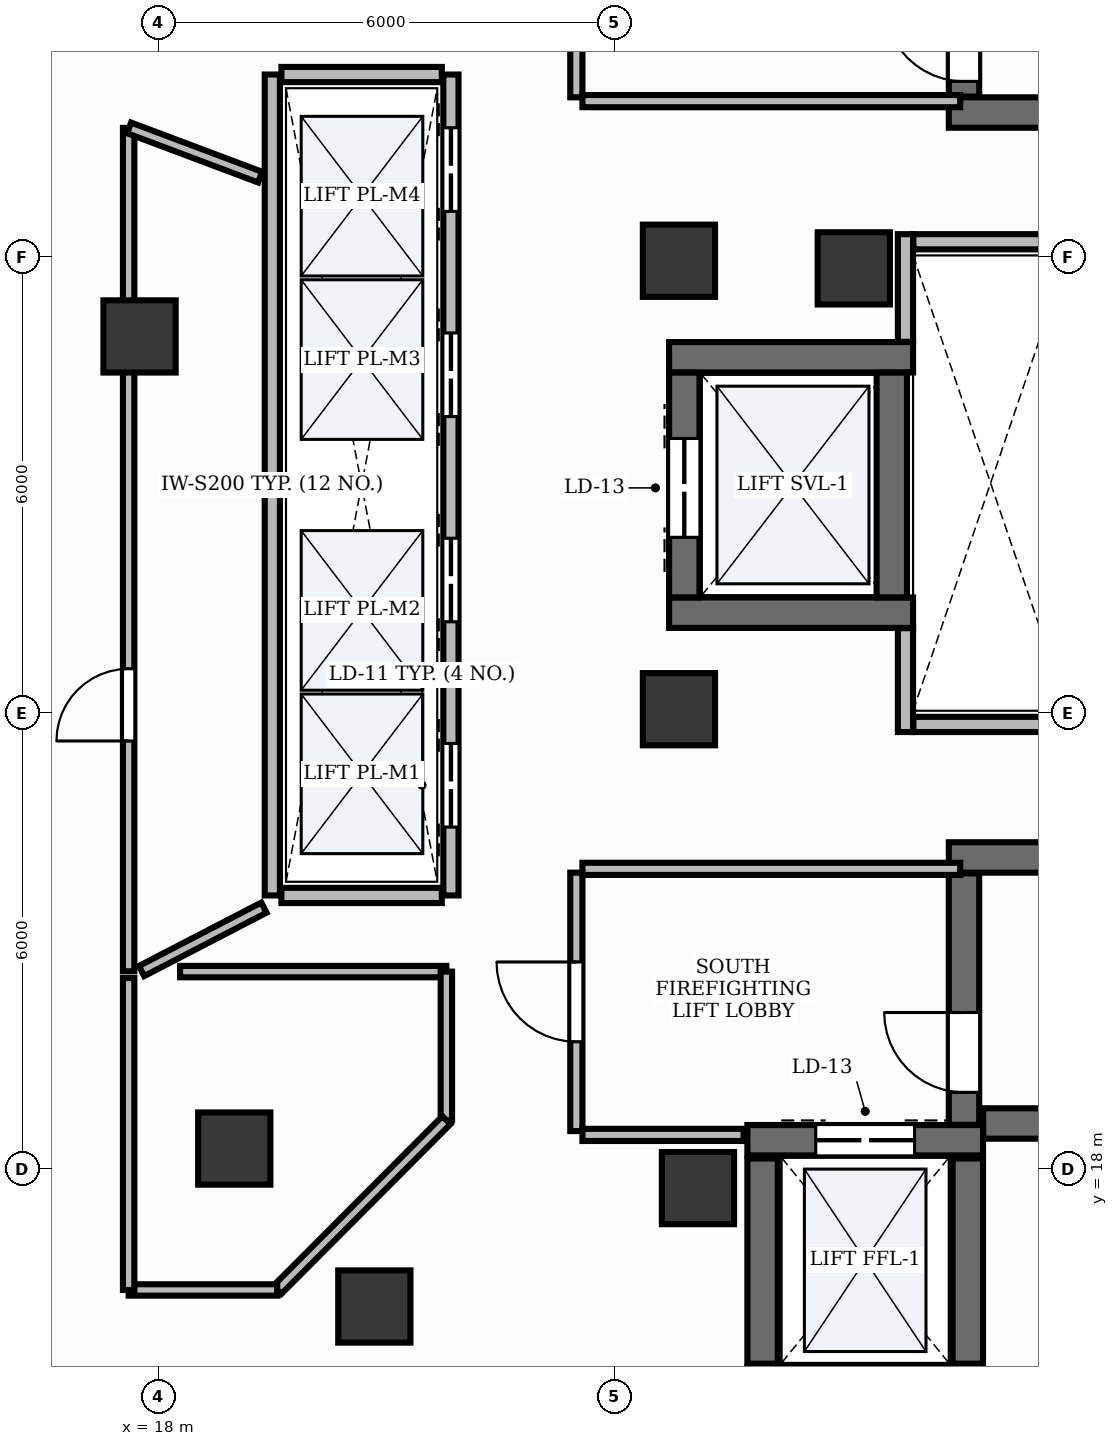
"""IFC4 building model, lengths in metres.
Left out: names, types, materials, properties, quantities, classifications, styles, units other than length and angle.
Written with IfcOpenShell. Run it as: python <this file> out.ifc"""

import sys

from ifc_helpers import new_model, si_unit, direction, frame, frame_2d, origin, origin_2d, place, context, subcontext, project, spatial, rectangle, extrude, element, fill, save


model = new_model("IFC4")
c1 = context("Model", 3, precision=1e-05, world=origin(), true_north=direction((0.0, 1.0)))
c2 = subcontext(c1, "Body", "Model", "MODEL_VIEW")
j1 = project(units=[si_unit("LENGTHUNIT", "METRE"), si_unit("PLANEANGLEUNIT", "RADIAN")], contexts=[c1])
p1 = place(None, origin())
s1 = spatial("IfcSite", under=j1, at=p1, CompositionType="ELEMENT")
p2 = place(p1, origin())
s2 = spatial("IfcBuilding", under=s1, at=p2, CompositionType="ELEMENT")
p3 = place(p2, frame((0.0, 0.0, 187.8)))
s3 = spatial("IfcBuildingStorey", under=s2, at=p3, CompositionType="ELEMENT", Elevation=187.8)
p4 = place(p3, frame((28.4, 31.9, 0.0), z_axis=(0.0, 0.0, 1.0), x_axis=(1.0, 0.0, 0.0)))
e1 = element("IfcWall", 1, at=p4, inside=s3, PredefinedType="SHEAR", context=c2, shape_type="SweptSolid", body=[
    extrude(rectangle(XDim=8.65, YDim=0.4, at=frame_2d((4.325, 0.0))), origin(), (0.0, 0.0, 1.0), 3.9),
])
p5 = place(p3, frame((28.6, 32.11, 0.0), z_axis=(0.0, 0.0, 1.0), x_axis=(0.0, 1.0, 0.0)))
e2 = element("IfcWall", 2, at=p5, inside=s3, PredefinedType="SHEAR", context=c2, shape_type="SweptSolid", body=[
    extrude(rectangle(XDim=3.308, YDim=0.4, at=frame_2d((1.654, 0.0))), origin(), (0.0, 0.0, 1.0), 3.9),
])
p6 = place(p5, frame((0.2, 0.0, 0.0)))
e3 = element("IfcOpeningElement", 3, at=p6, cuts=e2, PredefinedType="OPENING", context=c2, shape_type="SweptSolid", body=[
    extrude(rectangle(XDim=1.05, YDim=2.15, at=frame_2d((0.525, 1.075))), frame((0.0, 0.215, 0.0), z_axis=(0.0, -1.0, 0.0), x_axis=(1.0, 0.0, 0.0)), (0.0, 0.0, 1.0), 0.43),
])
p7 = place(p3, frame((28.852, 18.6, 0.0), z_axis=(0.0, 0.0, 1.0), x_axis=(1.0, 0.0, 0.0)))
e4 = element("IfcWall", 4, at=p7, inside=s3, PredefinedType="SHEAR", context=c2, shape_type="SweptSolid", body=[
    extrude(rectangle(XDim=8.198, YDim=0.4, at=frame_2d((4.099, 0.0))), origin(), (0.0, 0.0, 1.0), 3.9),
])
p8 = place(p3, frame((28.4, 22.1, 0.0), z_axis=(0.0, 0.0, 1.0), x_axis=(1.0, 0.0, 0.0)))
e5 = element("IfcWall", 5, at=p8, inside=s3, PredefinedType="SHEAR", context=c2, shape_type="SweptSolid", body=[
    extrude(rectangle(XDim=8.65, YDim=0.4, at=frame_2d((4.325, 0.0))), origin(), (0.0, 0.0, 1.0), 3.9),
])
p9 = place(p3, frame((28.6, 18.582, 0.0), z_axis=(0.0, 0.0, 1.0), x_axis=(0.0, 1.0, 0.0)))
e6 = element("IfcWall", 6, at=p9, inside=s3, PredefinedType="SHEAR", context=c2, shape_type="SweptSolid", body=[
    extrude(rectangle(XDim=3.308, YDim=0.4, at=frame_2d((1.654, 0.0))), origin(), (0.0, 0.0, 1.0), 3.9),
])
p10 = place(p9, frame((0.428, 0.0, 0.0)))
e7 = element("IfcOpeningElement", 7, at=p10, cuts=e6, PredefinedType="OPENING", context=c2, shape_type="SweptSolid", body=[
    extrude(rectangle(XDim=1.05, YDim=2.15, at=frame_2d((0.525, 1.075))), frame((0.0, 0.215, 0.0), z_axis=(0.0, -1.0, 0.0), x_axis=(1.0, 0.0, 0.0)), (0.0, 0.0, 1.0), 0.43),
])
p11 = place(p3, frame((25.75, 18.38, 0.0), z_axis=(0.0, 0.0, 1.0), x_axis=(1.0, 0.0, 0.0)))
e8 = element("IfcWall", 8, at=p11, inside=s3, PredefinedType="SHEAR", context=c2, shape_type="SweptSolid", body=[
    extrude(rectangle(XDim=3.1, YDim=0.4, at=frame_2d((1.55, 0.0))), origin(), (0.0, 0.0, 1.0), 3.9),
])
p12 = place(p11, frame((0.9, 0.0, 0.0)))
e9 = element("IfcOpeningElement", 9, at=p12, cuts=e8, PredefinedType="OPENING", context=c2, shape_type="SweptSolid", body=[
    extrude(rectangle(XDim=1.3, YDim=2.2, at=frame_2d((0.65, 1.1))), frame((0.0, 0.215, 0.0), z_axis=(0.0, -1.0, 0.0), x_axis=(1.0, 0.0, 0.0)), (0.0, 0.0, 1.0), 0.43),
])
for number, where, z_axis, x_axis in (
    (10, (25.95, 15.44, 0.0), (0.0, 0.0, 1.0), (0.0, 1.0, 0.0)),
    (11, (28.65, 15.44, 0.0), (0.0, 0.0, 1.0), (0.0, 1.0, 0.0)),
):
    element("IfcWall", number, at=place(p3, frame(where, z_axis=z_axis, x_axis=x_axis)), inside=s3, PredefinedType="SHEAR", context=c2, shape_type="SweptSolid", body=[
        extrude(rectangle(XDim=2.7, YDim=0.4, at=frame_2d((1.35, 0.0))), origin(), (0.0, 0.0, 1.0), 3.9),
    ])
for number, where, z_axis, x_axis in (
    (12, (24.72, 28.68, 0.0), (0.0, 0.0, 1.0), (1.0, 0.0, 0.0)),
    (13, (24.72, 25.32, 0.0), (0.0, 0.0, 1.0), (1.0, 0.0, 0.0)),
):
    element("IfcWall", number, at=place(p3, frame(where, z_axis=z_axis, x_axis=x_axis)), inside=s3, PredefinedType="SHEAR", context=c2, shape_type="SweptSolid", body=[
        extrude(rectangle(XDim=3.21, YDim=0.4, at=frame_2d((1.605, 0.0))), origin(), (0.0, 0.0, 1.0), 3.9),
    ])
p13 = place(p3, frame((24.92, 25.522, 0.0), z_axis=(0.0, 0.0, 1.0), x_axis=(0.0, 1.0, 0.0)))
e14 = element("IfcWall", 14, at=p13, inside=s3, PredefinedType="SHEAR", context=c2, shape_type="SweptSolid", body=[
    extrude(rectangle(XDim=2.956, YDim=0.4, at=frame_2d((1.478, 0.0))), origin(), (0.0, 0.0, 1.0), 3.9),
])
p14 = place(p13, frame((0.79, 0.0, 0.0)))
e15 = element("IfcOpeningElement", 15, at=p14, cuts=e14, PredefinedType="OPENING", context=c2, shape_type="SweptSolid", body=[
    extrude(rectangle(XDim=1.3, YDim=2.2, at=frame_2d((0.65, 1.1))), frame((0.0, 0.215, 0.0), z_axis=(0.0, -1.0, 0.0), x_axis=(1.0, 0.0, 0.0)), (0.0, 0.0, 1.0), 0.43),
])
p15 = place(p3, frame((27.65, 25.522, 0.0), z_axis=(0.0, 0.0, 1.0), x_axis=(0.0, 1.0, 0.0)))
e16 = element("IfcWall", 16, at=p15, inside=s3, PredefinedType="SHEAR", context=c2, shape_type="SweptSolid", body=[
    extrude(rectangle(XDim=2.956, YDim=0.4, at=frame_2d((1.478, 0.0))), origin(), (0.0, 0.0, 1.0), 3.9),
])
for number, where, z_axis, x_axis in (
    (17, (24.85, 29.95, -0.0), (0.0, 0.0, 1.0), (1.0, 0.0, 0.0)),
    (18, (27.15, 29.85, -0.0), (0.0, 0.0, 1.0), (1.0, 0.0, 0.0)),
    (19, (24.85, 24.05, -0.0), (0.0, 0.0, 1.0), (1.0, 0.0, 0.0)),
    (20, (25.1, 17.75, -0.0), (0.0, 0.0, 1.0), (1.0, 0.0, 0.0)),
):
    element("IfcColumn", number, at=place(p3, frame(where, z_axis=z_axis, x_axis=x_axis)), inside=s3, PredefinedType="PILASTER", context=c2, shape_type="SweptSolid", body=[
        extrude(rectangle(XDim=0.95, YDim=0.95, at=origin_2d()), origin(), (0.0, 0.0, 1.0), 3.901),
    ])
for number, where, z_axis, x_axis in (
    (21, (17.753, 28.955, -0.0), (0.0, 0.0, 1.0), (1.0, 0.0, 0.0)),
    (22, (19.0, 18.27, -0.0), (0.0, 0.0, 1.0), (1.0, 0.0, 0.0)),
    (23, (20.842, 16.192, -0.0), (0.0, 0.0, 1.0), (1.0, 0.0, 0.0)),
):
    element("IfcColumn", number, at=place(p3, frame(where, z_axis=z_axis, x_axis=x_axis)), inside=s3, PredefinedType="COLUMN", context=c2, shape_type="SweptSolid", body=[
        extrude(rectangle(XDim=0.95, YDim=0.95, at=origin_2d()), origin(), (0.0, 0.0, 1.0), 3.901),
    ])
p16 = place(p3, frame((19.5, 21.6, 0.0), z_axis=(0.0, 0.0, 1.0), x_axis=(0.0, 1.0, 0.0)))
e24 = element("IfcWall", 24, at=p16, inside=s3, PredefinedType="PARTITIONING", context=c2, shape_type="SweptSolid", body=[
    extrude(rectangle(XDim=10.8, YDim=0.2, at=frame_2d((5.4, 0.0))), origin(), (0.0, 0.0, 1.0), 2.91),
])
p17 = place(p3, frame((21.85, 21.6, 0.0), z_axis=(0.0, 0.0, 1.0), x_axis=(0.0, 1.0, 0.0)))
e25 = element("IfcWall", 25, at=p17, inside=s3, PredefinedType="PARTITIONING", context=c2, shape_type="SweptSolid", body=[
    extrude(rectangle(XDim=10.8, YDim=0.2, at=frame_2d((5.4, 0.0))), origin(), (0.0, 0.0, 1.0), 2.91),
])
p18 = place(p17, frame((0.9, 0.0, 0.0)))
e26 = element("IfcOpeningElement", 26, at=p18, cuts=e25, PredefinedType="OPENING", context=c2, shape_type="SweptSolid", body=[
    extrude(rectangle(XDim=1.1, YDim=2.2, at=frame_2d((0.55, 1.1))), frame((0.0, 0.115, 0.0), z_axis=(0.0, -1.0, 0.0), x_axis=(1.0, 0.0, 0.0)), (0.0, 0.0, 1.0), 0.23),
])
p19 = place(p17, frame((3.6, 0.0, 0.0)))
e27 = element("IfcOpeningElement", 27, at=p19, cuts=e25, PredefinedType="OPENING", context=c2, shape_type="SweptSolid", body=[
    extrude(rectangle(XDim=1.1, YDim=2.2, at=frame_2d((0.55, 1.1))), frame((0.0, 0.115, 0.0), z_axis=(0.0, -1.0, 0.0), x_axis=(1.0, 0.0, 0.0)), (0.0, 0.0, 1.0), 0.23),
])
p20 = place(p17, frame((6.3, 0.0, 0.0)))
e28 = element("IfcOpeningElement", 28, at=p20, cuts=e25, PredefinedType="OPENING", context=c2, shape_type="SweptSolid", body=[
    extrude(rectangle(XDim=1.1, YDim=2.2, at=frame_2d((0.55, 1.1))), frame((0.0, 0.115, 0.0), z_axis=(0.0, -1.0, 0.0), x_axis=(1.0, 0.0, 0.0)), (0.0, 0.0, 1.0), 0.23),
])
p21 = place(p17, frame((9.0, 0.0, 0.0)))
e29 = element("IfcOpeningElement", 29, at=p21, cuts=e25, PredefinedType="OPENING", context=c2, shape_type="SweptSolid", body=[
    extrude(rectangle(XDim=1.1, YDim=2.2, at=frame_2d((0.55, 1.1))), frame((0.0, 0.115, 0.0), z_axis=(0.0, -1.0, 0.0), x_axis=(1.0, 0.0, 0.0)), (0.0, 0.0, 1.0), 0.23),
])
for number, where, z_axis, x_axis in (
    (30, (19.62, 21.6, 0.0), (0.0, 0.0, 1.0), (1.0, 0.0, 0.0)),
    (31, (19.62, 32.4, 0.0), (0.0, 0.0, 1.0), (1.0, 0.0, 0.0)),
):
    element("IfcWall", number, at=place(p3, frame(where, z_axis=z_axis, x_axis=x_axis)), inside=s3, PredefinedType="PARTITIONING", context=c2, shape_type="SweptSolid", body=[
        extrude(rectangle(XDim=2.11, YDim=0.2, at=frame_2d((1.055, 0.0))), origin(), (0.0, 0.0, 1.0), 2.91),
    ])
p22 = place(p3, frame((27.83, 23.75, 0.0), z_axis=(0.0, 0.0, 1.0), x_axis=(0.0, 1.0, 0.0)))
e32 = element("IfcWall", 32, at=p22, inside=s3, PredefinedType="PARTITIONING", context=c2, shape_type="SweptSolid", body=[
    extrude(rectangle(XDim=1.366, YDim=0.2, at=frame_2d((0.683, 0.0))), origin(), (0.0, 0.0, 1.0), 2.91),
])
p23 = place(p3, frame((27.83, 28.884, 0.0), z_axis=(0.0, 0.0, 1.0), x_axis=(0.0, 1.0, 0.0)))
e33 = element("IfcWall", 33, at=p23, inside=s3, PredefinedType="PARTITIONING", context=c2, shape_type="SweptSolid", body=[
    extrude(rectangle(XDim=1.416, YDim=0.2, at=frame_2d((0.708, 0.0))), origin(), (0.0, 0.0, 1.0), 2.91),
])
for number, where, z_axis, x_axis in (
    (34, (27.934, 23.85, 0.0), (0.0, 0.0, 1.0), (1.0, 0.0, 0.0)),
    (35, (27.934, 30.2, 0.0), (0.0, 0.0, 1.0), (1.0, 0.0, 0.0)),
):
    element("IfcWall", number, at=place(p3, frame(where, z_axis=z_axis, x_axis=x_axis)), inside=s3, PredefinedType="PARTITIONING", context=c2, shape_type="SweptSolid", body=[
        extrude(rectangle(XDim=2.096, YDim=0.2, at=frame_2d((1.048, 0.0))), origin(), (0.0, 0.0, 1.0), 2.91),
    ])
p24 = place(p3, frame((23.5, 32.1, 0.0), z_axis=(0.0, 0.0, 1.0), x_axis=(0.0, 1.0, 0.0)))
e36 = element("IfcWall", 36, at=p24, inside=s3, PredefinedType="PARTITIONING", context=c2, shape_type="SweptSolid", body=[
    extrude(rectangle(XDim=3.4, YDim=0.16, at=frame_2d((1.7, 0.0))), origin(), (0.0, 0.0, 1.0), 2.91),
])
p25 = place(p24, frame((1.175, 0.0, 0.0)))
e37 = element("IfcOpeningElement", 37, at=p25, cuts=e36, PredefinedType="OPENING", context=c2, shape_type="SweptSolid", body=[
    extrude(rectangle(XDim=1.05, YDim=2.15, at=frame_2d((0.525, 1.075))), frame((0.0, 0.095, 0.0), z_axis=(0.0, -1.0, 0.0), x_axis=(1.0, 0.0, 0.0)), (0.0, 0.0, 1.0), 0.19),
])
p26 = place(p3, frame((23.5, 18.5, 0.0), z_axis=(0.0, 0.0, 1.0), x_axis=(0.0, 1.0, 0.0)))
e38 = element("IfcWall", 38, at=p26, inside=s3, PredefinedType="PARTITIONING", context=c2, shape_type="SweptSolid", body=[
    extrude(rectangle(XDim=3.4, YDim=0.16, at=frame_2d((1.7, 0.0))), origin(), (0.0, 0.0, 1.0), 2.91),
])
p27 = place(p26, frame((1.175, 0.0, 0.0)))
e39 = element("IfcOpeningElement", 39, at=p27, cuts=e38, PredefinedType="OPENING", context=c2, shape_type="SweptSolid", body=[
    extrude(rectangle(XDim=1.05, YDim=2.15, at=frame_2d((0.525, 1.075))), frame((0.0, 0.095, 0.0), z_axis=(0.0, -1.0, 0.0), x_axis=(1.0, 0.0, 0.0)), (0.0, 0.0, 1.0), 0.19),
])
for number, where, z_axis, x_axis in (
    (40, (23.58, 32.05, 0.0), (0.0, 0.0, 1.0), (1.0, 0.0, 0.0)),
    (41, (23.58, 21.95, 0.0), (0.0, 0.0, 1.0), (1.0, 0.0, 0.0)),
):
    element("IfcWall", number, at=place(p3, frame(where, z_axis=z_axis, x_axis=x_axis)), inside=s3, PredefinedType="PARTITIONING", context=c2, shape_type="SweptSolid", body=[
        extrude(rectangle(XDim=4.97, YDim=0.16, at=frame_2d((2.485, 0.0))), origin(), (0.0, 0.0, 1.0), 2.91),
    ])
p28 = place(p3, frame((23.58, 18.45, 0.0), z_axis=(0.0, 0.0, 1.0), x_axis=(1.0, 0.0, 0.0)))
e42 = element("IfcWall", 42, at=p28, inside=s3, PredefinedType="PARTITIONING", context=c2, shape_type="SweptSolid", body=[
    extrude(rectangle(XDim=2.12, YDim=0.16, at=frame_2d((1.06, 0.0))), origin(), (0.0, 0.0, 1.0), 2.91),
])
p29 = place(p3, frame((17.61, 20.602, 0.0), z_axis=(0.0, 0.0, 1.0), x_axis=(0.0, 1.0, 0.0)))
e43 = element("IfcWall", 43, at=p29, inside=s3, PredefinedType="PARTITIONING", context=c2, shape_type="SweptSolid", body=[
    extrude(rectangle(XDim=11.096, YDim=0.15, at=frame_2d((5.548, 0.0))), origin(), (0.0, 0.0, 1.0), 2.91),
])
p30 = place(p29, frame((3.03, 0.0, 0.0)))
e44 = element("IfcOpeningElement", 44, at=p30, cuts=e43, PredefinedType="OPENING", context=c2, shape_type="SweptSolid", body=[
    extrude(rectangle(XDim=0.95, YDim=2.15, at=frame_2d((0.475, 1.075))), frame((0.0, 0.09, 0.0), z_axis=(0.0, -1.0, 0.0), x_axis=(1.0, 0.0, 0.0)), (0.0, 0.0, 1.0), 0.18),
])
p31 = place(p3, frame((17.616, 31.698, 0.0), z_axis=(0.0, 0.0, 1.0), x_axis=(0.936061955156, -0.351835211583, 0.0)))
e45 = element("IfcWall", 45, at=p31, inside=s3, PredefinedType="PARTITIONING", context=c2, shape_type="SweptSolid", body=[
    extrude(rectangle(XDim=1.842, YDim=0.15, at=frame_2d((0.921, 0.0))), origin(), (0.0, 0.0, 1.0), 2.91),
])
p32 = place(p3, frame((19.39, 21.44, 0.0), z_axis=(0.0, 0.0, 1.0), x_axis=(-0.887870664605, -0.460093124197, 0.0)))
e46 = element("IfcWall", 46, at=p32, inside=s3, PredefinedType="PARTITIONING", context=c2, shape_type="SweptSolid", body=[
    extrude(rectangle(XDim=1.813, YDim=0.15, at=frame_2d((0.907, 0.0))), origin(), (0.0, 0.0, 1.0), 2.91),
])
p33 = place(p3, frame((18.287, 20.598, 0.0), z_axis=(0.0, 0.0, 1.0), x_axis=(1.0, 0.0, 0.0)))
e47 = element("IfcWall", 47, at=p33, inside=s3, PredefinedType="PARTITIONING", context=c2, shape_type="SweptSolid", body=[
    extrude(rectangle(XDim=3.503, YDim=0.15, at=frame_2d((1.751, 0.0))), origin(), (0.0, 0.0, 1.0), 2.91),
])
p34 = place(p3, frame((21.79, 20.598, 0.0), z_axis=(0.0, 0.0, 1.0), x_axis=(0.0, -1.0, 0.0)))
e48 = element("IfcWall", 48, at=p34, inside=s3, PredefinedType="PARTITIONING", context=c2, shape_type="SweptSolid", body=[
    extrude(rectangle(XDim=1.955, YDim=0.15, at=frame_2d((0.977, 0.0))), origin(), (0.0, 0.0, 1.0), 2.91),
])
p35 = place(p3, frame((21.79, 18.643, 0.0), z_axis=(0.0, 0.0, 1.0), x_axis=(-0.705866789687, -0.708344602024, 0.0)))
e49 = element("IfcWall", 49, at=p35, inside=s3, PredefinedType="PARTITIONING", context=c2, shape_type="SweptSolid", body=[
    extrude(rectangle(XDim=3.153, YDim=0.15, at=frame_2d((1.577, 0.0))), origin(), (0.0, 0.0, 1.0), 2.91),
])
p36 = place(p3, frame((19.564, 16.41, 0.0), z_axis=(0.0, 0.0, 1.0), x_axis=(-1.0, 0.0, 0.0)))
e50 = element("IfcWall", 50, at=p36, inside=s3, PredefinedType="PARTITIONING", context=c2, shape_type="SweptSolid", body=[
    extrude(rectangle(XDim=1.954, YDim=0.15, at=frame_2d((0.977, 0.0))), origin(), (0.0, 0.0, 1.0), 2.91),
])
p37 = place(p3, frame((17.61, 16.41, 0.0), z_axis=(0.0, 0.0, 1.0), x_axis=(0.0, 1.0, 0.0)))
e51 = element("IfcWall", 51, at=p37, inside=s3, PredefinedType="PARTITIONING", context=c2, shape_type="SweptSolid", body=[
    extrude(rectangle(XDim=4.103, YDim=0.15, at=frame_2d((2.052, 0.0))), origin(), (0.0, 0.0, 1.0), 2.91),
])
p38 = place(p6, origin())
e52 = element("IfcDoor", 52, at=p38, inside=s3, OperationType="SINGLE_SWING_RIGHT", PredefinedType="DOOR", context=c2, shape_type="SweptSolid", body=[
    extrude(rectangle(XDim=1.05, YDim=2.15, at=frame_2d((0.525, 1.075))), frame((0.0, 0.025, 0.0), z_axis=(0.0, -1.0, 0.0), x_axis=(1.0, 0.0, 0.0)), (0.0, 0.0, 1.0), 0.05),
])
fill(e3, e52)
p39 = place(p10, origin())
e53 = element("IfcDoor", 53, at=p39, inside=s3, OperationType="SINGLE_SWING_RIGHT", PredefinedType="DOOR", context=c2, shape_type="SweptSolid", body=[
    extrude(rectangle(XDim=1.05, YDim=2.15, at=frame_2d((0.525, 1.075))), frame((0.0, 0.025, 0.0), z_axis=(0.0, -1.0, 0.0), x_axis=(1.0, 0.0, 0.0)), (0.0, 0.0, 1.0), 0.05),
])
fill(e7, e53)
p40 = place(p18, origin())
e54 = element("IfcDoor", 54, at=p40, inside=s3, OperationType="DOUBLE_DOOR_SLIDING", PredefinedType="DOOR", context=c2, shape_type="SweptSolid", body=[
    extrude(rectangle(XDim=1.1, YDim=2.2, at=frame_2d((0.55, 1.1))), frame((0.0, 0.025, 0.0), z_axis=(0.0, -1.0, 0.0), x_axis=(1.0, 0.0, 0.0)), (0.0, 0.0, 1.0), 0.05),
])
fill(e26, e54)
p41 = place(p19, origin())
e55 = element("IfcDoor", 55, at=p41, inside=s3, OperationType="DOUBLE_DOOR_SLIDING", PredefinedType="DOOR", context=c2, shape_type="SweptSolid", body=[
    extrude(rectangle(XDim=1.1, YDim=2.2, at=frame_2d((0.55, 1.1))), frame((0.0, 0.025, 0.0), z_axis=(0.0, -1.0, 0.0), x_axis=(1.0, 0.0, 0.0)), (0.0, 0.0, 1.0), 0.05),
])
fill(e27, e55)
p42 = place(p20, origin())
e56 = element("IfcDoor", 56, at=p42, inside=s3, OperationType="DOUBLE_DOOR_SLIDING", PredefinedType="DOOR", context=c2, shape_type="SweptSolid", body=[
    extrude(rectangle(XDim=1.1, YDim=2.2, at=frame_2d((0.55, 1.1))), frame((0.0, 0.025, 0.0), z_axis=(0.0, -1.0, 0.0), x_axis=(1.0, 0.0, 0.0)), (0.0, 0.0, 1.0), 0.05),
])
fill(e28, e56)
p43 = place(p21, origin())
e57 = element("IfcDoor", 57, at=p43, inside=s3, OperationType="DOUBLE_DOOR_SLIDING", PredefinedType="DOOR", context=c2, shape_type="SweptSolid", body=[
    extrude(rectangle(XDim=1.1, YDim=2.2, at=frame_2d((0.55, 1.1))), frame((0.0, 0.025, 0.0), z_axis=(0.0, -1.0, 0.0), x_axis=(1.0, 0.0, 0.0)), (0.0, 0.0, 1.0), 0.05),
])
fill(e29, e57)
p44 = place(p12, origin())
e58 = element("IfcDoor", 58, at=p44, inside=s3, OperationType="DOUBLE_DOOR_SLIDING", PredefinedType="DOOR", context=c2, shape_type="SweptSolid", body=[
    extrude(rectangle(XDim=1.3, YDim=2.2, at=frame_2d((0.65, 1.1))), frame((0.0, 0.025, 0.0), z_axis=(0.0, -1.0, 0.0), x_axis=(1.0, 0.0, 0.0)), (0.0, 0.0, 1.0), 0.05),
])
fill(e9, e58)
p45 = place(p14, origin())
e59 = element("IfcDoor", 59, at=p45, inside=s3, OperationType="DOUBLE_DOOR_SLIDING", PredefinedType="DOOR", context=c2, shape_type="SweptSolid", body=[
    extrude(rectangle(XDim=1.3, YDim=2.2, at=frame_2d((0.65, 1.1))), frame((0.0, 0.025, 0.0), z_axis=(0.0, -1.0, 0.0), x_axis=(1.0, 0.0, 0.0)), (0.0, 0.0, 1.0), 0.05),
])
fill(e15, e59)
p46 = place(p27, origin())
e60 = element("IfcDoor", 60, at=p46, inside=s3, OperationType="SINGLE_SWING_RIGHT", PredefinedType="DOOR", context=c2, shape_type="SweptSolid", body=[
    extrude(rectangle(XDim=1.05, YDim=2.15, at=frame_2d((0.525, 1.075))), frame((0.0, 0.025, 0.0), z_axis=(0.0, -1.0, 0.0), x_axis=(1.0, 0.0, 0.0)), (0.0, 0.0, 1.0), 0.05),
])
fill(e39, e60)
p47 = place(p30, origin())
e61 = element("IfcDoor", 61, at=p47, inside=s3, OperationType="SINGLE_SWING_LEFT", PredefinedType="DOOR", context=c2, shape_type="SweptSolid", body=[
    extrude(rectangle(XDim=0.95, YDim=2.15, at=frame_2d((0.475, 1.075))), frame((0.0, 0.025, 0.0), z_axis=(0.0, -1.0, 0.0), x_axis=(1.0, 0.0, 0.0)), (0.0, 0.0, 1.0), 0.05),
])
fill(e44, e61)
save(model, sys.argv[1])
